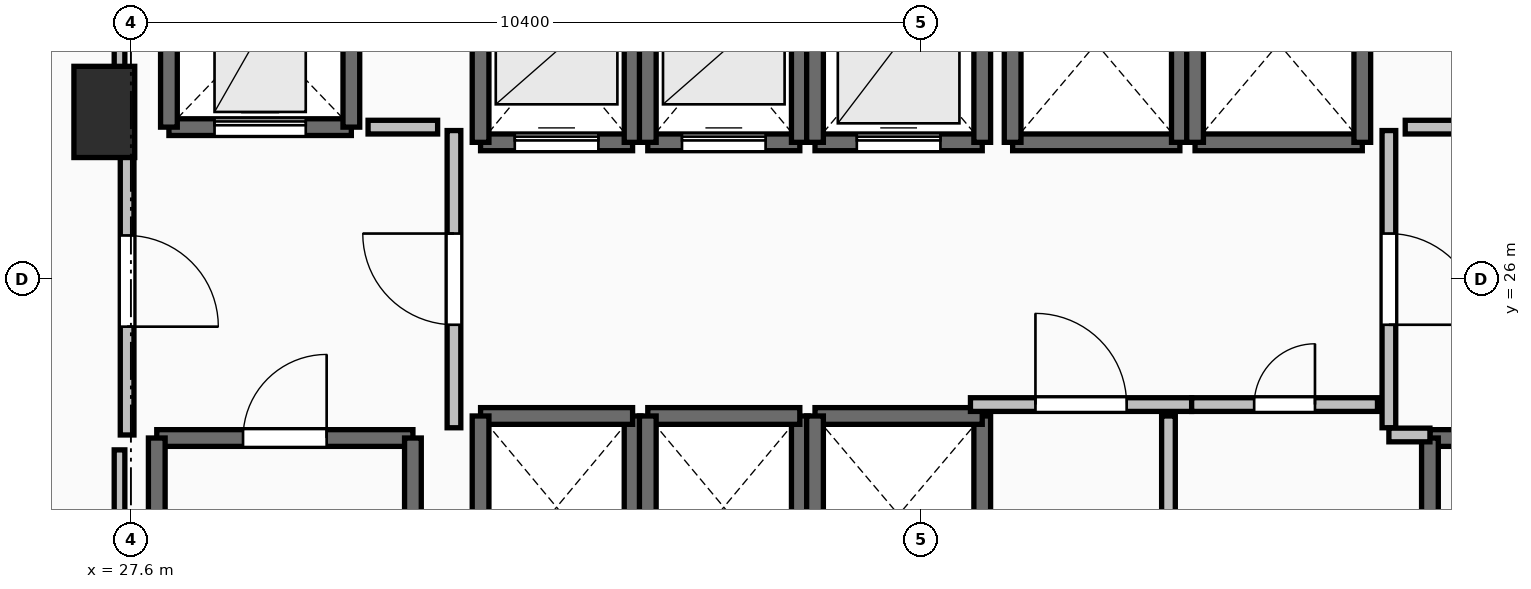
"""IFC4 building model, lengths in metres.
Left out: names, types, materials, properties, quantities, classifications, styles, units other than length and angle.
Written with IfcOpenShell. Run it as: python <this file> out.ifc"""

import sys

from ifc_helpers import new_model, si_unit, direction, frame, frame_2d, origin, origin_2d, place, context, subcontext, project, spatial, rectangle, extrude, element, fill, save


model = new_model("IFC4")
c1 = context("Model", 3, precision=1e-05, world=origin(), true_north=direction((0.0, 1.0)))
c2 = subcontext(c1, "Body", "Model", "MODEL_VIEW")
j1 = project(units=[si_unit("LENGTHUNIT", "METRE"), si_unit("PLANEANGLEUNIT", "RADIAN")], contexts=[c1])
p1 = place(None, origin())
s1 = spatial("IfcSite", under=j1, at=p1, CompositionType="ELEMENT")
p2 = place(p1, origin())
s2 = spatial("IfcBuilding", under=s1, at=p2, CompositionType="ELEMENT")
p3 = place(p2, frame((0.0, 0.0, 55.5)))
s3 = spatial("IfcBuildingStorey", under=s2, at=p3, CompositionType="ELEMENT", Elevation=55.5)
p4 = place(p3, frame((27.25, 28.2, 0.0), z_axis=(0.0, 0.0, 1.0), x_axis=(1.0, 0.0, 0.0)))
e1 = element("IfcColumn", 1, at=p4, inside=s3, PredefinedType="PILASTER", context=c2, shape_type="SweptSolid", body=[
    extrude(rectangle(XDim=0.8, YDim=1.2, at=origin_2d()), origin(), (0.0, 0.0, 1.0), 3.5),
])
p5 = place(p3, frame((27.94, 23.91, 0.0), z_axis=(0.0, 0.0, 1.0), x_axis=(1.0, 0.0, 0.0)))
e2 = element("IfcWall", 2, at=p5, inside=s3, PredefinedType="SOLIDWALL", context=c2, shape_type="SweptSolid", body=[
    extrude(rectangle(XDim=3.37, YDim=0.22, at=frame_2d((1.685, 0.0))), origin(), (0.0, 0.0, 1.0), 3.24),
])
p6 = place(p5, frame((1.135, 0.0, 0.0)))
e3 = element("IfcOpeningElement", 3, at=p6, cuts=e2, PredefinedType="OPENING", context=c2, shape_type="SweptSolid", body=[
    extrude(rectangle(XDim=1.1, YDim=2.15, at=frame_2d((0.55, 1.075))), frame((0.0, 0.125, 0.0), z_axis=(0.0, -1.0, 0.0), x_axis=(1.0, 0.0, 0.0)), (0.0, 0.0, 1.0), 0.25),
])
for number, where, z_axis, x_axis in (
    (4, (31.31, 23.91, 0.0), (0.0, 0.0, 1.0), (0.0, -1.0, 0.0)),
    (5, (27.94, 16.49, 0.0), (0.0, 0.0, 1.0), (0.0, 1.0, 0.0)),
):
    element("IfcWall", number, at=place(p3, frame(where, z_axis=z_axis, x_axis=x_axis)), inside=s3, PredefinedType="SOLIDWALL", context=c2, shape_type="SweptSolid", body=[
        extrude(rectangle(XDim=7.42, YDim=0.22, at=frame_2d((3.71, 0.0))), origin(), (0.0, 0.0, 1.0), 3.24),
    ])
p7 = place(p3, frame((44.69, 23.91, 0.0), z_axis=(0.0, 0.0, 1.0), x_axis=(1.0, 0.0, 0.0)))
e6 = element("IfcWall", 6, at=p7, inside=s3, PredefinedType="SOLIDWALL", context=c2, shape_type="SweptSolid", body=[
    extrude(rectangle(XDim=3.37, YDim=0.22, at=frame_2d((1.685, 0.0))), origin(), (0.0, 0.0, 1.0), 3.24),
])
p8 = place(p7, frame((1.135, 0.0, 0.0)))
e7 = element("IfcOpeningElement", 7, at=p8, cuts=e6, PredefinedType="OPENING", context=c2, shape_type="SweptSolid", body=[
    extrude(rectangle(XDim=1.1, YDim=2.15, at=frame_2d((0.55, 1.075))), frame((0.0, 0.125, 0.0), z_axis=(0.0, -1.0, 0.0), x_axis=(1.0, 0.0, 0.0)), (0.0, 0.0, 1.0), 0.25),
])
p9 = place(p3, frame((44.69, 16.49, 0.0), z_axis=(0.0, 0.0, 1.0), x_axis=(0.0, 1.0, 0.0)))
e8 = element("IfcWall", 8, at=p9, inside=s3, PredefinedType="SOLIDWALL", context=c2, shape_type="SweptSolid", body=[
    extrude(rectangle(XDim=7.42, YDim=0.22, at=frame_2d((3.71, 0.0))), origin(), (0.0, 0.0, 1.0), 3.24),
])
p10 = place(p3, frame((32.2, 27.8, 0.0), z_axis=(0.0, 0.0, 1.0), x_axis=(1.0, 0.0, 0.0)))
e9 = element("IfcWall", 9, at=p10, inside=s3, PredefinedType="SOLIDWALL", context=c2, shape_type="SweptSolid", body=[
    extrude(rectangle(XDim=2.0, YDim=0.22, at=frame_2d((1.0, 0.0))), origin(), (0.0, 0.0, 1.0), 3.24),
])
p11 = place(p10, frame((0.45, 0.0, 0.0)))
e10 = element("IfcOpeningElement", 10, at=p11, cuts=e9, PredefinedType="OPENING", context=c2, shape_type="SweptSolid", body=[
    extrude(rectangle(XDim=1.1, YDim=2.2, at=frame_2d((0.55, 1.1))), frame((0.0, 0.125, 0.0), z_axis=(0.0, -1.0, 0.0), x_axis=(1.0, 0.0, 0.0)), (0.0, 0.0, 1.0), 0.25),
])
for number, where, z_axis, x_axis in (
    (11, (34.2, 27.8, 0.0), (0.0, 0.0, 1.0), (0.0, 1.0, 0.0)),
    (12, (32.2, 30.2, 0.0), (0.0, 0.0, 1.0), (0.0, -1.0, 0.0)),
):
    element("IfcWall", number, at=place(p3, frame(where, z_axis=z_axis, x_axis=x_axis)), inside=s3, PredefinedType="SOLIDWALL", context=c2, shape_type="SweptSolid", body=[
        extrude(rectangle(XDim=2.4, YDim=0.22, at=frame_2d((1.2, 0.0))), origin(), (0.0, 0.0, 1.0), 3.24),
    ])
p12 = place(p3, frame((34.4, 27.8, 0.0), z_axis=(0.0, 0.0, 1.0), x_axis=(1.0, 0.0, 0.0)))
e13 = element("IfcWall", 13, at=p12, inside=s3, PredefinedType="SOLIDWALL", context=c2, shape_type="SweptSolid", body=[
    extrude(rectangle(XDim=2.0, YDim=0.22, at=frame_2d((1.0, 0.0))), origin(), (0.0, 0.0, 1.0), 3.24),
])
p13 = place(p12, frame((0.45, 0.0, 0.0)))
e14 = element("IfcOpeningElement", 14, at=p13, cuts=e13, PredefinedType="OPENING", context=c2, shape_type="SweptSolid", body=[
    extrude(rectangle(XDim=1.1, YDim=2.2, at=frame_2d((0.55, 1.1))), frame((0.0, 0.125, 0.0), z_axis=(0.0, -1.0, 0.0), x_axis=(1.0, 0.0, 0.0)), (0.0, 0.0, 1.0), 0.25),
])
for number, where, z_axis, x_axis in (
    (15, (36.4, 27.8, 0.0), (0.0, 0.0, 1.0), (0.0, 1.0, 0.0)),
    (16, (34.4, 30.2, 0.0), (0.0, 0.0, 1.0), (0.0, -1.0, 0.0)),
):
    element("IfcWall", number, at=place(p3, frame(where, z_axis=z_axis, x_axis=x_axis)), inside=s3, PredefinedType="SOLIDWALL", context=c2, shape_type="SweptSolid", body=[
        extrude(rectangle(XDim=2.4, YDim=0.22, at=frame_2d((1.2, 0.0))), origin(), (0.0, 0.0, 1.0), 3.24),
    ])
p14 = place(p3, frame((36.6, 27.8, 0.0), z_axis=(0.0, 0.0, 1.0), x_axis=(1.0, 0.0, 0.0)))
e17 = element("IfcWall", 17, at=p14, inside=s3, PredefinedType="SOLIDWALL", context=c2, shape_type="SweptSolid", body=[
    extrude(rectangle(XDim=2.2, YDim=0.22, at=frame_2d((1.1, 0.0))), origin(), (0.0, 0.0, 1.0), 3.24),
])
p15 = place(p14, frame((0.55, 0.0, 0.0)))
e18 = element("IfcOpeningElement", 18, at=p15, cuts=e17, PredefinedType="OPENING", context=c2, shape_type="SweptSolid", body=[
    extrude(rectangle(XDim=1.1, YDim=2.2, at=frame_2d((0.55, 1.1))), frame((0.0, 0.125, 0.0), z_axis=(0.0, -1.0, 0.0), x_axis=(1.0, 0.0, 0.0)), (0.0, 0.0, 1.0), 0.25),
])
for number, where, z_axis, x_axis in (
    (19, (38.8, 27.8, 0.0), (0.0, 0.0, 1.0), (0.0, 1.0, 0.0)),
    (20, (36.6, 30.4, 0.0), (0.0, 0.0, 1.0), (0.0, -1.0, 0.0)),
):
    element("IfcWall", number, at=place(p3, frame(where, z_axis=z_axis, x_axis=x_axis)), inside=s3, PredefinedType="SOLIDWALL", context=c2, shape_type="SweptSolid", body=[
        extrude(rectangle(XDim=2.6, YDim=0.22, at=frame_2d((1.3, 0.0))), origin(), (0.0, 0.0, 1.0), 3.24),
    ])
p16 = place(p3, frame((34.2, 21.8, 0.0), z_axis=(0.0, 0.0, 1.0), x_axis=(0.0, 1.0, 0.0)))
e21 = element("IfcWall", 21, at=p16, inside=s3, PredefinedType="SOLIDWALL", context=c2, shape_type="SweptSolid", body=[
    extrude(rectangle(XDim=2.4, YDim=0.22, at=frame_2d((1.2, 0.0))), origin(), (0.0, 0.0, 1.0), 3.24),
])
p17 = place(p3, frame((34.2, 24.2, 0.0), z_axis=(0.0, 0.0, 1.0), x_axis=(-1.0, 0.0, 0.0)))
e22 = element("IfcWall", 22, at=p17, inside=s3, PredefinedType="SOLIDWALL", context=c2, shape_type="SweptSolid", body=[
    extrude(rectangle(XDim=2.0, YDim=0.22, at=frame_2d((1.0, 0.0))), origin(), (0.0, 0.0, 1.0), 3.24),
])
for number, where, z_axis, x_axis in (
    (23, (32.2, 24.2, 0.0), (0.0, 0.0, 1.0), (0.0, -1.0, 0.0)),
    (24, (36.4, 21.8, 0.0), (0.0, 0.0, 1.0), (0.0, 1.0, 0.0)),
):
    element("IfcWall", number, at=place(p3, frame(where, z_axis=z_axis, x_axis=x_axis)), inside=s3, PredefinedType="SOLIDWALL", context=c2, shape_type="SweptSolid", body=[
        extrude(rectangle(XDim=2.4, YDim=0.22, at=frame_2d((1.2, 0.0))), origin(), (0.0, 0.0, 1.0), 3.24),
    ])
p18 = place(p3, frame((36.4, 24.2, 0.0), z_axis=(0.0, 0.0, 1.0), x_axis=(-1.0, 0.0, 0.0)))
e25 = element("IfcWall", 25, at=p18, inside=s3, PredefinedType="SOLIDWALL", context=c2, shape_type="SweptSolid", body=[
    extrude(rectangle(XDim=2.0, YDim=0.22, at=frame_2d((1.0, 0.0))), origin(), (0.0, 0.0, 1.0), 3.24),
])
p19 = place(p3, frame((34.4, 24.2, 0.0), z_axis=(0.0, 0.0, 1.0), x_axis=(0.0, -1.0, 0.0)))
e26 = element("IfcWall", 26, at=p19, inside=s3, PredefinedType="SOLIDWALL", context=c2, shape_type="SweptSolid", body=[
    extrude(rectangle(XDim=2.4, YDim=0.22, at=frame_2d((1.2, 0.0))), origin(), (0.0, 0.0, 1.0), 3.24),
])
p20 = place(p3, frame((38.8, 21.6, 0.0), z_axis=(0.0, 0.0, 1.0), x_axis=(0.0, 1.0, 0.0)))
e27 = element("IfcWall", 27, at=p20, inside=s3, PredefinedType="SOLIDWALL", context=c2, shape_type="SweptSolid", body=[
    extrude(rectangle(XDim=2.6, YDim=0.22, at=frame_2d((1.3, 0.0))), origin(), (0.0, 0.0, 1.0), 3.24),
])
p21 = place(p3, frame((38.8, 24.2, 0.0), z_axis=(0.0, 0.0, 1.0), x_axis=(-1.0, 0.0, 0.0)))
e28 = element("IfcWall", 28, at=p21, inside=s3, PredefinedType="SOLIDWALL", context=c2, shape_type="SweptSolid", body=[
    extrude(rectangle(XDim=2.2, YDim=0.22, at=frame_2d((1.1, 0.0))), origin(), (0.0, 0.0, 1.0), 3.24),
])
p22 = place(p3, frame((36.6, 24.2, 0.0), z_axis=(0.0, 0.0, 1.0), x_axis=(0.0, -1.0, 0.0)))
e29 = element("IfcWall", 29, at=p22, inside=s3, PredefinedType="SOLIDWALL", context=c2, shape_type="SweptSolid", body=[
    extrude(rectangle(XDim=2.6, YDim=0.22, at=frame_2d((1.3, 0.0))), origin(), (0.0, 0.0, 1.0), 3.24),
])
p23 = place(p3, frame((39.2, 27.8, 0.0), z_axis=(0.0, 0.0, 1.0), x_axis=(1.0, 0.0, 0.0)))
e30 = element("IfcWall", 30, at=p23, inside=s3, PredefinedType="SOLIDWALL", context=c2, shape_type="SweptSolid", body=[
    extrude(rectangle(XDim=2.2, YDim=0.22, at=frame_2d((1.1, 0.0))), origin(), (0.0, 0.0, 1.0), 3.24),
])
for number, where, z_axis, x_axis in (
    (31, (41.4, 27.8, 0.0), (0.0, 0.0, 1.0), (0.0, 1.0, 0.0)),
    (32, (39.2, 30.4, 0.0), (0.0, 0.0, 1.0), (0.0, -1.0, 0.0)),
):
    element("IfcWall", number, at=place(p3, frame(where, z_axis=z_axis, x_axis=x_axis)), inside=s3, PredefinedType="SOLIDWALL", context=c2, shape_type="SweptSolid", body=[
        extrude(rectangle(XDim=2.6, YDim=0.22, at=frame_2d((1.3, 0.0))), origin(), (0.0, 0.0, 1.0), 3.24),
    ])
p24 = place(p3, frame((41.6, 27.8, 0.0), z_axis=(0.0, 0.0, 1.0), x_axis=(1.0, 0.0, 0.0)))
e33 = element("IfcWall", 33, at=p24, inside=s3, PredefinedType="SOLIDWALL", context=c2, shape_type="SweptSolid", body=[
    extrude(rectangle(XDim=2.2, YDim=0.22, at=frame_2d((1.1, 0.0))), origin(), (0.0, 0.0, 1.0), 3.24),
])
for number, where, z_axis, x_axis in (
    (34, (43.8, 27.8, 0.0), (0.0, 0.0, 1.0), (0.0, 1.0, 0.0)),
    (35, (41.6, 30.4, 0.0), (0.0, 0.0, 1.0), (0.0, -1.0, 0.0)),
):
    element("IfcWall", number, at=place(p3, frame(where, z_axis=z_axis, x_axis=x_axis)), inside=s3, PredefinedType="SOLIDWALL", context=c2, shape_type="SweptSolid", body=[
        extrude(rectangle(XDim=2.6, YDim=0.22, at=frame_2d((1.3, 0.0))), origin(), (0.0, 0.0, 1.0), 3.24),
    ])
p25 = place(p3, frame((28.1, 28.0, 0.0), z_axis=(0.0, 0.0, 1.0), x_axis=(1.0, 0.0, 0.0)))
e36 = element("IfcWall", 36, at=p25, inside=s3, PredefinedType="SHEAR", context=c2, shape_type="SweptSolid", body=[
    extrude(rectangle(XDim=2.4, YDim=0.22, at=frame_2d((1.2, 0.0))), origin(), (0.0, 0.0, 1.0), 3.24),
])
p26 = place(p25, frame((0.6, 0.0, 0.0)))
e37 = element("IfcOpeningElement", 37, at=p26, cuts=e36, PredefinedType="OPENING", context=c2, shape_type="SweptSolid", body=[
    extrude(rectangle(XDim=1.2, YDim=2.2, at=frame_2d((0.6, 1.1))), frame((0.0, 0.125, 0.0), z_axis=(0.0, -1.0, 0.0), x_axis=(1.0, 0.0, 0.0)), (0.0, 0.0, 1.0), 0.25),
])
for number, where, z_axis, x_axis in (
    (38, (30.5, 28.0, 0.0), (0.0, 0.0, 1.0), (0.0, 1.0, 0.0)),
    (39, (28.1, 30.5, 0.0), (0.0, 0.0, 1.0), (0.0, -1.0, 0.0)),
):
    element("IfcWall", number, at=place(p3, frame(where, z_axis=z_axis, x_axis=x_axis)), inside=s3, PredefinedType="SHEAR", context=c2, shape_type="SweptSolid", body=[
        extrude(rectangle(XDim=2.5, YDim=0.22, at=frame_2d((1.25, 0.0))), origin(), (0.0, 0.0, 1.0), 3.24),
    ])
p27 = place(p3, frame((31.85, 24.045, 0.0), z_axis=(0.0, 0.0, 1.0), x_axis=(0.0, 1.0, 0.0)))
e40 = element("IfcWall", 40, at=p27, inside=s3, PredefinedType="PARTITIONING", context=c2, shape_type="SweptSolid", body=[
    extrude(rectangle(XDim=3.91, YDim=0.18, at=frame_2d((1.955, 0.0))), origin(), (0.0, 0.0, 1.0), 3.24),
])
p28 = place(p27, frame((1.355, 0.0, 0.0)))
e41 = element("IfcOpeningElement", 41, at=p28, cuts=e40, PredefinedType="OPENING", context=c2, shape_type="SweptSolid", body=[
    extrude(rectangle(XDim=1.2, YDim=2.15, at=frame_2d((0.6, 1.075))), frame((0.0, 0.105, 0.0), z_axis=(0.0, -1.0, 0.0), x_axis=(1.0, 0.0, 0.0)), (0.0, 0.0, 1.0), 0.21),
])
p29 = place(p3, frame((27.55, 28.0, 0.0), z_axis=(0.0, 0.0, 1.0), x_axis=(0.0, -1.0, 0.0)))
e42 = element("IfcWall", 42, at=p29, inside=s3, PredefinedType="PARTITIONING", context=c2, shape_type="SweptSolid", body=[
    extrude(rectangle(XDim=4.05, YDim=0.18, at=frame_2d((2.025, 0.0))), origin(), (0.0, 0.0, 1.0), 3.24),
])
p30 = place(p29, frame((1.425, 0.0, 0.0)))
e43 = element("IfcOpeningElement", 43, at=p30, cuts=e42, PredefinedType="OPENING", context=c2, shape_type="SweptSolid", body=[
    extrude(rectangle(XDim=1.2, YDim=2.15, at=frame_2d((0.6, 1.075))), frame((0.0, 0.105, 0.0), z_axis=(0.0, -1.0, 0.0), x_axis=(1.0, 0.0, 0.0)), (0.0, 0.0, 1.0), 0.21),
])
p31 = place(p3, frame((44.15, 27.955, 0.0), z_axis=(0.0, 0.0, 1.0), x_axis=(0.0, -1.0, 0.0)))
e44 = element("IfcWall", 44, at=p31, inside=s3, PredefinedType="PARTITIONING", context=c2, shape_type="SweptSolid", body=[
    extrude(rectangle(XDim=3.91, YDim=0.18, at=frame_2d((1.955, 0.0))), origin(), (0.0, 0.0, 1.0), 3.24),
])
p32 = place(p31, frame((1.355, 0.0, 0.0)))
e45 = element("IfcOpeningElement", 45, at=p32, cuts=e44, PredefinedType="OPENING", context=c2, shape_type="SweptSolid", body=[
    extrude(rectangle(XDim=1.2, YDim=2.15, at=frame_2d((0.6, 1.075))), frame((0.0, 0.105, 0.0), z_axis=(0.0, -1.0, 0.0), x_axis=(1.0, 0.0, 0.0)), (0.0, 0.0, 1.0), 0.21),
])
p33 = place(p3, frame((44.15, 23.95, 0.0), z_axis=(0.0, 0.0, 1.0), x_axis=(1.0, 0.0, 0.0)))
e46 = element("IfcWall", 46, at=p33, inside=s3, PredefinedType="PARTITIONING", context=c2, shape_type="SweptSolid", body=[
    extrude(rectangle(XDim=0.54, YDim=0.18, at=frame_2d((0.27, 0.0))), origin(), (0.0, 0.0, 1.0), 3.24),
])
p34 = place(p3, frame((38.645, 24.35, 0.0), z_axis=(0.0, 0.0, 1.0), x_axis=(1.0, 0.0, 0.0)))
e47 = element("IfcWall", 47, at=p34, inside=s3, PredefinedType="PARTITIONING", context=c2, shape_type="SweptSolid", body=[
    extrude(rectangle(XDim=2.91, YDim=0.18, at=frame_2d((1.455, 0.0))), origin(), (0.0, 0.0, 1.0), 3.24),
])
p35 = place(p34, frame((0.855, 0.0, 0.0)))
e48 = element("IfcOpeningElement", 48, at=p35, cuts=e47, PredefinedType="OPENING", context=c2, shape_type="SweptSolid", body=[
    extrude(rectangle(XDim=1.2, YDim=2.15, at=frame_2d((0.6, 1.075))), frame((0.0, 0.105, 0.0), z_axis=(0.0, -1.0, 0.0), x_axis=(1.0, 0.0, 0.0)), (0.0, 0.0, 1.0), 0.21),
])
p36 = place(p3, frame((41.555, 24.35, 0.0), z_axis=(0.0, 0.0, 1.0), x_axis=(1.0, 0.0, 0.0)))
e49 = element("IfcWall", 49, at=p36, inside=s3, PredefinedType="PARTITIONING", context=c2, shape_type="SweptSolid", body=[
    extrude(rectangle(XDim=2.445, YDim=0.18, at=frame_2d((1.223, 0.0))), origin(), (0.0, 0.0, 1.0), 3.24),
])
p37 = place(p36, frame((0.823, 0.0, 0.0)))
e50 = element("IfcOpeningElement", 50, at=p37, cuts=e49, PredefinedType="OPENING", context=c2, shape_type="SweptSolid", body=[
    extrude(rectangle(XDim=0.8, YDim=2.05, at=frame_2d((0.4, 1.025))), frame((0.0, 0.105, 0.0), z_axis=(0.0, -1.0, 0.0), x_axis=(1.0, 0.0, 0.0)), (0.0, 0.0, 1.0), 0.21),
])
p38 = place(p3, frame((41.25, 16.32, 0.0), z_axis=(0.0, 0.0, 1.0), x_axis=(0.0, 1.0, 0.0)))
e51 = element("IfcWall", 51, at=p38, inside=s3, PredefinedType="PARTITIONING", context=c2, shape_type="SweptSolid", body=[
    extrude(rectangle(XDim=7.88, YDim=0.18, at=frame_2d((3.94, 0.0))), origin(), (0.0, 0.0, 1.0), 3.24),
])
p39 = place(p38, frame((3.54, 0.0, 0.0)))
e52 = element("IfcOpeningElement", 52, at=p39, cuts=e51, PredefinedType="OPENING", context=c2, shape_type="SweptSolid", body=[
    extrude(rectangle(XDim=0.8, YDim=2.05, at=frame_2d((0.4, 1.025))), frame((0.0, 0.105, 0.0), z_axis=(0.0, -1.0, 0.0), x_axis=(1.0, 0.0, 0.0)), (0.0, 0.0, 1.0), 0.21),
])
for number, where, z_axis, x_axis in (
    (53, (31.635, 28.0, 0.0), (0.0, 0.0, 1.0), (-1.0, 0.0, 0.0)),
    (54, (45.28, 28.0, 0.0), (0.0, 0.0, 1.0), (-1.0, 0.0, 0.0)),
):
    element("IfcWall", number, at=place(p3, frame(where, z_axis=z_axis, x_axis=x_axis)), inside=s3, PredefinedType="PARTITIONING", context=c2, shape_type="SweptSolid", body=[
        extrude(rectangle(XDim=0.915, YDim=0.18, at=frame_2d((0.458, 0.0))), origin(), (0.0, 0.0, 1.0), 3.24),
    ])
p40 = place(p3, frame((27.45, 16.24, 0.0), z_axis=(0.0, 0.0, 1.0), x_axis=(0.0, 1.0, 0.0)))
e55 = element("IfcWall", 55, at=p40, inside=s3, PredefinedType="PARTITIONING", context=c2, shape_type="SweptSolid", body=[
    extrude(rectangle(XDim=7.514, YDim=0.14, at=frame_2d((3.757, 0.0))), origin(), (0.0, 0.0, 1.0), 2.432),
])
p41 = place(p3, frame((27.45, 28.196, 0.0), z_axis=(0.0, 0.0, 1.0), x_axis=(0.0, 1.0, 0.0)))
e56 = element("IfcWall", 56, at=p41, inside=s3, PredefinedType="PARTITIONING", context=c2, shape_type="SweptSolid", body=[
    extrude(rectangle(XDim=5.254, YDim=0.14, at=frame_2d((2.627, 0.0))), origin(), (0.0, 0.0, 1.0), 2.432),
])
p42 = place(p6, origin())
e57 = element("IfcDoor", 57, at=p42, inside=s3, OperationType="SINGLE_SWING_RIGHT", PredefinedType="DOOR", context=c2, shape_type="SweptSolid", body=[
    extrude(rectangle(XDim=1.1, YDim=2.15, at=frame_2d((0.55, 1.075))), frame((0.0, 0.025, 0.0), z_axis=(0.0, -1.0, 0.0), x_axis=(1.0, 0.0, 0.0)), (0.0, 0.0, 1.0), 0.05),
])
fill(e3, e57)
p43 = place(p11, origin())
e58 = element("IfcDoor", 58, at=p43, inside=s3, OperationType="SLIDING_TO_LEFT", PredefinedType="DOOR", context=c2, shape_type="SweptSolid", body=[
    extrude(rectangle(XDim=1.1, YDim=2.2, at=frame_2d((0.55, 1.1))), frame((0.0, 0.025, 0.0), z_axis=(0.0, -1.0, 0.0), x_axis=(1.0, 0.0, 0.0)), (0.0, 0.0, 1.0), 0.05),
])
fill(e10, e58)
p44 = place(p13, origin())
e59 = element("IfcDoor", 59, at=p44, inside=s3, OperationType="SLIDING_TO_LEFT", PredefinedType="DOOR", context=c2, shape_type="SweptSolid", body=[
    extrude(rectangle(XDim=1.1, YDim=2.2, at=frame_2d((0.55, 1.1))), frame((0.0, 0.025, 0.0), z_axis=(0.0, -1.0, 0.0), x_axis=(1.0, 0.0, 0.0)), (0.0, 0.0, 1.0), 0.05),
])
fill(e14, e59)
p45 = place(p15, origin())
e60 = element("IfcDoor", 60, at=p45, inside=s3, OperationType="SLIDING_TO_LEFT", PredefinedType="DOOR", context=c2, shape_type="SweptSolid", body=[
    extrude(rectangle(XDim=1.1, YDim=2.2, at=frame_2d((0.55, 1.1))), frame((0.0, 0.025, 0.0), z_axis=(0.0, -1.0, 0.0), x_axis=(1.0, 0.0, 0.0)), (0.0, 0.0, 1.0), 0.05),
])
fill(e18, e60)
p46 = place(p26, origin())
e61 = element("IfcDoor", 61, at=p46, inside=s3, OperationType="SLIDING_TO_LEFT", PredefinedType="DOOR", context=c2, shape_type="SweptSolid", body=[
    extrude(rectangle(XDim=1.2, YDim=2.2, at=frame_2d((0.6, 1.1))), frame((0.0, 0.025, 0.0), z_axis=(0.0, -1.0, 0.0), x_axis=(1.0, 0.0, 0.0)), (0.0, 0.0, 1.0), 0.05),
])
fill(e37, e61)
p47 = place(p28, origin())
e62 = element("IfcDoor", 62, at=p47, inside=s3, OperationType="SINGLE_SWING_RIGHT", PredefinedType="DOOR", context=c2, shape_type="SweptSolid", body=[
    extrude(rectangle(XDim=1.2, YDim=2.15, at=frame_2d((0.6, 1.075))), frame((0.0, 0.025, 0.0), z_axis=(0.0, -1.0, 0.0), x_axis=(1.0, 0.0, 0.0)), (0.0, 0.0, 1.0), 0.05),
])
fill(e41, e62)
p48 = place(p30, origin())
e63 = element("IfcDoor", 63, at=p48, inside=s3, OperationType="SINGLE_SWING_RIGHT", PredefinedType="DOOR", context=c2, shape_type="SweptSolid", body=[
    extrude(rectangle(XDim=1.2, YDim=2.15, at=frame_2d((0.6, 1.075))), frame((0.0, 0.025, 0.0), z_axis=(0.0, -1.0, 0.0), x_axis=(1.0, 0.0, 0.0)), (0.0, 0.0, 1.0), 0.05),
])
fill(e43, e63)
p49 = place(p32, origin())
e64 = element("IfcDoor", 64, at=p49, inside=s3, OperationType="SINGLE_SWING_RIGHT", PredefinedType="DOOR", context=c2, shape_type="SweptSolid", body=[
    extrude(rectangle(XDim=1.2, YDim=2.15, at=frame_2d((0.6, 1.075))), frame((0.0, 0.025, 0.0), z_axis=(0.0, -1.0, 0.0), x_axis=(1.0, 0.0, 0.0)), (0.0, 0.0, 1.0), 0.05),
])
fill(e45, e64)
p50 = place(p35, origin())
e65 = element("IfcDoor", 65, at=p50, inside=s3, OperationType="SINGLE_SWING_LEFT", PredefinedType="DOOR", context=c2, shape_type="SweptSolid", body=[
    extrude(rectangle(XDim=1.2, YDim=2.15, at=frame_2d((0.6, 1.075))), frame((0.0, 0.025, 0.0), z_axis=(0.0, -1.0, 0.0), x_axis=(1.0, 0.0, 0.0)), (0.0, 0.0, 1.0), 0.05),
])
fill(e48, e65)
p51 = place(p37, origin())
e66 = element("IfcDoor", 66, at=p51, inside=s3, OperationType="SINGLE_SWING_RIGHT", PredefinedType="DOOR", context=c2, shape_type="SweptSolid", body=[
    extrude(rectangle(XDim=0.8, YDim=2.05, at=frame_2d((0.4, 1.025))), frame((0.0, 0.025, 0.0), z_axis=(0.0, -1.0, 0.0), x_axis=(1.0, 0.0, 0.0)), (0.0, 0.0, 1.0), 0.05),
])
fill(e50, e66)
save(model, sys.argv[1])
